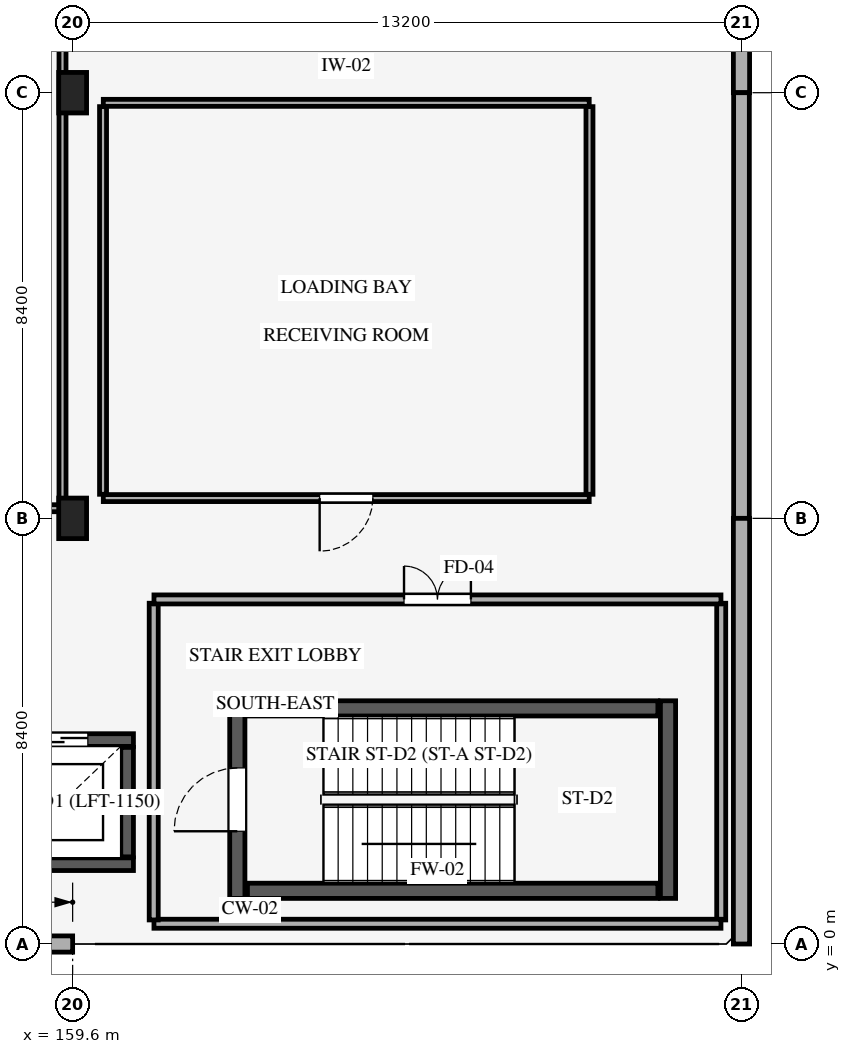
"""IFC4 building model, lengths in metres.
Left out: names, types, materials, properties, quantities, classifications, styles, units other than length and angle.
Written with IfcOpenShell. Run it as: python <this file> out.ifc"""

import sys

from ifc_helpers import new_model, si_unit, direction, frame, frame_2d, origin, origin_2d, place, context, subcontext, project, spatial, rectangle, extrude, element, fill, save


model = new_model("IFC4")
c1 = context("Model", 3, precision=1e-05, world=origin(), true_north=direction((0.0, 1.0)))
c2 = subcontext(c1, "Body", "Model", "MODEL_VIEW")
j1 = project(units=[si_unit("LENGTHUNIT", "METRE"), si_unit("PLANEANGLEUNIT", "RADIAN")], contexts=[c1])
p1 = place(None, origin())
s1 = spatial("IfcSite", under=j1, at=p1, CompositionType="ELEMENT")
p2 = place(p1, origin())
s2 = spatial("IfcBuilding", under=s1, at=p2, CompositionType="ELEMENT")
p3 = place(p2, origin())
s3 = spatial("IfcBuildingStorey", under=s2, at=p3, CompositionType="ELEMENT", Elevation=0.0)
p4 = place(p3, frame((159.6, 0.0, 0.0), z_axis=(0.0, 0.0, 1.0), x_axis=(1.0, 0.0, 0.0)))
e1 = element("IfcColumn", 1, at=p4, inside=s3, PredefinedType="COLUMN", context=c2, shape_type="SweptSolid", body=[
    extrude(rectangle(XDim=0.85, YDim=0.85, at=origin_2d()), origin(), (0.0, 0.0, 1.0), 4.8),
])
for number, where, z_axis, x_axis in (
    (2, (159.6, 8.4, 0.0), (0.0, 0.0, 1.0), (1.0, 0.0, 0.0)),
    (3, (159.6, 16.8, 0.0), (0.0, 0.0, 1.0), (1.0, 0.0, 0.0)),
):
    element("IfcColumn", number, at=place(p3, frame(where, z_axis=z_axis, x_axis=x_axis)), inside=s3, PredefinedType="COLUMN", context=c2, shape_type="SweptSolid", body=[
        extrude(rectangle(XDim=0.55, YDim=0.8, at=origin_2d()), origin(), (0.0, 0.0, 1.0), 4.8),
    ])
for number, where, z_axis, x_axis in (
    (4, (172.8, 0.0, 0.0), (0.0, 0.0, 1.0), (1.0, 0.0, 0.0)),
    (5, (172.8, 8.4, 0.0), (0.0, 0.0, 1.0), (1.0, 0.0, 0.0)),
    (6, (172.8, 16.8, 0.0), (0.0, 0.0, 1.0), (1.0, 0.0, 0.0)),
):
    element("IfcColumn", number, at=place(p3, frame(where, z_axis=z_axis, x_axis=x_axis)), inside=s3, PredefinedType="COLUMN", context=c2, shape_type="SweptSolid", body=[
        extrude(rectangle(XDim=0.85, YDim=0.85, at=origin_2d()), origin(), (0.0, 0.0, 1.0), 4.8),
    ])
p5 = place(p3, frame((172.8, 25.2, 0.0), z_axis=(0.0, 0.0, 1.0), x_axis=(0.0, -1.0, 0.0)))
e7 = element("IfcWall", 7, at=p5, inside=s3, PredefinedType="STANDARD", context=c2, shape_type="SweptSolid", body=[
    extrude(rectangle(XDim=8.4, YDim=0.32, at=frame_2d((4.2, 0.0))), origin(), (0.0, 0.0, 1.0), 3.67),
])
p6 = place(p3, frame((172.8, 16.8, 0.0), z_axis=(0.0, 0.0, 1.0), x_axis=(0.0, -1.0, 0.0)))
e8 = element("IfcWall", 8, at=p6, inside=s3, PredefinedType="STANDARD", context=c2, shape_type="SweptSolid", body=[
    extrude(rectangle(XDim=8.4, YDim=0.31, at=frame_2d((4.2, 0.0))), origin(), (0.0, 0.0, 1.0), 3.67),
])
p7 = place(p6, frame((2.3, 0.0, 0.0)))
e9 = element("IfcOpeningElement", 9, at=p7, cuts=e8, PredefinedType="OPENING", context=c2, shape_type="SweptSolid", body=[
    extrude(rectangle(XDim=3.8, YDim=3.25, at=frame_2d((1.9, 1.625))), frame((0.0, 0.165, 0.0), z_axis=(0.0, -1.0, 0.0), x_axis=(1.0, 0.0, 0.0)), (0.0, 0.0, 1.0), 0.33),
])
p8 = place(p3, frame((172.8, 8.4, 0.0), z_axis=(0.0, 0.0, 1.0), x_axis=(0.0, -1.0, 0.0)))
e10 = element("IfcWall", 10, at=p8, inside=s3, PredefinedType="STANDARD", context=c2, shape_type="SweptSolid", body=[
    extrude(rectangle(XDim=8.4, YDim=0.32, at=frame_2d((4.2, 0.0))), origin(), (0.0, 0.0, 1.0), 3.67),
])
p9 = place(p8, frame((2.138, 0.0, 1.2)))
e11 = element("IfcOpeningElement", 11, at=p9, cuts=e10, PredefinedType="OPENING", context=c2, shape_type="SweptSolid", body=[
    extrude(rectangle(XDim=1.8, YDim=1.35, at=frame_2d((0.9, 0.675))), frame((0.0, 0.17, 0.0), z_axis=(0.0, -1.0, 0.0), x_axis=(1.0, 0.0, 0.0)), (0.0, 0.0, 1.0), 0.34),
])
p10 = place(p8, frame((4.812, 0.0, 1.2)))
e12 = element("IfcOpeningElement", 12, at=p10, cuts=e10, PredefinedType="OPENING", context=c2, shape_type="SweptSolid", body=[
    extrude(rectangle(XDim=1.8, YDim=1.35, at=frame_2d((0.9, 0.675))), frame((0.0, 0.17, 0.0), z_axis=(0.0, -1.0, 0.0), x_axis=(1.0, 0.0, 0.0)), (0.0, 0.0, 1.0), 0.34),
])
p11 = place(p3, frame((159.6, 0.0, 0.0), z_axis=(0.0, 0.0, 1.0), x_axis=(-1.0, 0.0, 0.0)))
e13 = element("IfcWall", 13, at=p11, inside=s3, PredefinedType="STANDARD", context=c2, shape_type="SweptSolid", body=[
    extrude(rectangle(XDim=13.2, YDim=0.32, at=frame_2d((6.6, 0.0))), origin(), (0.0, 0.0, 1.0), 3.67),
])
p12 = place(p11, frame((3.324, 0.0, 1.2)))
e14 = element("IfcOpeningElement", 14, at=p12, cuts=e13, PredefinedType="OPENING", context=c2, shape_type="SweptSolid", body=[
    extrude(rectangle(XDim=1.8, YDim=1.35, at=frame_2d((0.9, 0.675))), frame((0.0, 0.17, 0.0), z_axis=(0.0, -1.0, 0.0), x_axis=(1.0, 0.0, 0.0)), (0.0, 0.0, 1.0), 0.34),
])
p13 = place(p11, frame((8.076, 0.0, 1.2)))
e15 = element("IfcOpeningElement", 15, at=p13, cuts=e13, PredefinedType="OPENING", context=c2, shape_type="SweptSolid", body=[
    extrude(rectangle(XDim=1.8, YDim=1.35, at=frame_2d((0.9, 0.675))), frame((0.0, 0.17, 0.0), z_axis=(0.0, -1.0, 0.0), x_axis=(1.0, 0.0, 0.0)), (0.0, 0.0, 1.0), 0.34),
])
p14 = place(p3, frame((162.85, 4.8, 0.0), z_axis=(0.0, 0.0, 1.0), x_axis=(0.0, -1.0, 0.0)))
e16 = element("IfcWall", 16, at=p14, inside=s3, PredefinedType="SHEAR", context=c2, shape_type="SweptSolid", body=[
    extrude(rectangle(XDim=3.9, YDim=0.3, at=frame_2d((1.95, 0.0))), origin(), (0.0, 0.0, 1.0), 4.495),
])
p15 = place(p14, frame((1.325, 0.0, 0.0)))
e17 = element("IfcOpeningElement", 17, at=p15, cuts=e16, PredefinedType="OPENING", context=c2, shape_type="SweptSolid", body=[
    extrude(rectangle(XDim=1.25, YDim=2.2, at=frame_2d((0.625, 1.1))), frame((0.0, 0.16, 0.0), z_axis=(0.0, -1.0, 0.0), x_axis=(1.0, 0.0, 0.0)), (0.0, 0.0, 1.0), 0.32),
])
p16 = place(p3, frame((163.05, 1.05, 0.0), z_axis=(0.0, 0.0, 1.0), x_axis=(1.0, 0.0, 0.0)))
e18 = element("IfcWall", 18, at=p16, inside=s3, PredefinedType="SHEAR", context=c2, shape_type="SweptSolid", body=[
    extrude(rectangle(XDim=8.1, YDim=0.3, at=frame_2d((4.05, 0.0))), origin(), (0.0, 0.0, 1.0), 4.495),
])
p17 = place(p3, frame((171.35, 0.9, 0.0), z_axis=(0.0, 0.0, 1.0), x_axis=(0.0, 1.0, 0.0)))
e19 = element("IfcWall", 19, at=p17, inside=s3, PredefinedType="SHEAR", context=c2, shape_type="SweptSolid", body=[
    extrude(rectangle(XDim=3.9, YDim=0.3, at=frame_2d((1.95, 0.0))), origin(), (0.0, 0.0, 1.0), 4.495),
])
p18 = place(p3, frame((171.15, 4.65, 0.0), z_axis=(0.0, 0.0, 1.0), x_axis=(-1.0, 0.0, 0.0)))
e20 = element("IfcWall", 20, at=p18, inside=s3, PredefinedType="SHEAR", context=c2, shape_type="SweptSolid", body=[
    extrude(rectangle(XDim=8.1, YDim=0.3, at=frame_2d((4.05, 0.0))), origin(), (0.0, 0.0, 1.0), 4.495),
])
p19 = place(p3, frame((160.8, 1.575, 0.0), z_axis=(0.0, 0.0, 1.0), x_axis=(-1.0, 0.0, 0.0)))
e21 = element("IfcWall", 21, at=p19, inside=s3, PredefinedType="SHEAR", context=c2, shape_type="SweptSolid", body=[
    extrude(rectangle(XDim=2.8, YDim=0.25, at=frame_2d((1.4, 0.0))), origin(), (0.0, 0.0, 1.0), 4.52),
])
p20 = place(p3, frame((158.0, 4.025, 0.0), z_axis=(0.0, 0.0, 1.0), x_axis=(1.0, 0.0, 0.0)))
e22 = element("IfcWall", 22, at=p20, inside=s3, PredefinedType="SHEAR", context=c2, shape_type="SweptSolid", body=[
    extrude(rectangle(XDim=2.8, YDim=0.25, at=frame_2d((1.4, 0.0))), origin(), (0.0, 0.0, 1.0), 4.52),
])
p21 = place(p20, frame((0.9, 0.0, 0.0)))
e23 = element("IfcOpeningElement", 23, at=p21, cuts=e22, PredefinedType="OPENING", context=c2, shape_type="SweptSolid", body=[
    extrude(rectangle(XDim=1.0, YDim=2.15, at=frame_2d((0.5, 1.075))), frame((0.0, 0.135, 0.0), z_axis=(0.0, -1.0, 0.0), x_axis=(1.0, 0.0, 0.0)), (0.0, 0.0, 1.0), 0.27),
])
p22 = place(p3, frame((160.675, 3.88, 0.0), z_axis=(0.0, 0.0, 1.0), x_axis=(0.0, -1.0, 0.0)))
e24 = element("IfcWall", 24, at=p22, inside=s3, PredefinedType="SHEAR", context=c2, shape_type="SweptSolid", body=[
    extrude(rectangle(XDim=2.16, YDim=0.25, at=frame_2d((1.08, 0.0))), origin(), (0.0, 0.0, 1.0), 4.52),
])
p23 = place(p3, frame((172.4, 6.725, 0.0), z_axis=(0.0, 0.0, 1.0), x_axis=(0.0, -1.0, 0.0)))
e25 = element("IfcWall", 25, at=p23, inside=s3, PredefinedType="STANDARD", context=c2, shape_type="SweptSolid", body=[
    extrude(rectangle(XDim=6.25, YDim=0.178, at=frame_2d((3.125, 0.0))), origin(), (0.0, 0.0, 1.0), 3.67),
])
p24 = place(p3, frame((172.395, 0.4, 0.0), z_axis=(0.0, 0.0, 1.0), x_axis=(-1.0, 0.0, 0.0)))
e26 = element("IfcWall", 26, at=p24, inside=s3, PredefinedType="STANDARD", context=c2, shape_type="SweptSolid", body=[
    extrude(rectangle(XDim=11.19, YDim=0.178, at=frame_2d((5.595, 0.0))), origin(), (0.0, 0.0, 1.0), 3.67),
])
p25 = place(p3, frame((161.2, 0.475, 0.0), z_axis=(0.0, 0.0, 1.0), x_axis=(0.0, 1.0, 0.0)))
e27 = element("IfcWall", 27, at=p25, inside=s3, PredefinedType="STANDARD", context=c2, shape_type="SweptSolid", body=[
    extrude(rectangle(XDim=6.25, YDim=0.178, at=frame_2d((3.125, 0.0))), origin(), (0.0, 0.0, 1.0), 4.49),
])
p26 = place(p3, frame((161.205, 6.8, 0.0), z_axis=(0.0, 0.0, 1.0), x_axis=(1.0, 0.0, 0.0)))
e28 = element("IfcWall", 28, at=p26, inside=s3, PredefinedType="STANDARD", context=c2, shape_type="SweptSolid", body=[
    extrude(rectangle(XDim=11.19, YDim=0.178, at=frame_2d((5.595, 0.0))), origin(), (0.0, 0.0, 1.0), 3.67),
])
p27 = place(p26, frame((4.935, 0.0, 0.0)))
e29 = element("IfcOpeningElement", 29, at=p27, cuts=e28, PredefinedType="OPENING", context=c2, shape_type="SweptSolid", body=[
    extrude(rectangle(XDim=1.32, YDim=2.22, at=frame_2d((0.66, 1.11))), frame((0.0, 0.099, 0.0), z_axis=(0.0, -1.0, 0.0), x_axis=(1.0, 0.0, 0.0)), (0.0, 0.0, 1.0), 0.198),
])
p28 = place(p3, frame((159.395, 8.6, 0.0), z_axis=(0.0, 0.0, 1.0), x_axis=(-1.0, 0.0, 0.0)))
e30 = element("IfcWall", 30, at=p28, inside=s3, PredefinedType="STANDARD", context=c2, shape_type="SweptSolid", body=[
    extrude(rectangle(XDim=35.59, YDim=0.138, at=frame_2d((17.795, 0.0))), origin(), (0.0, 0.0, 1.0), 3.27),
])
p29 = place(p28, frame((17.27, 0.0, 0.0)))
e31 = element("IfcOpeningElement", 31, at=p29, cuts=e30, PredefinedType="OPENING", context=c2, shape_type="SweptSolid", body=[
    extrude(rectangle(XDim=1.05, YDim=2.15, at=frame_2d((0.525, 1.075))), frame((0.0, 0.079, 0.0), z_axis=(0.0, -1.0, 0.0), x_axis=(1.0, 0.0, 0.0)), (0.0, 0.0, 1.0), 0.158),
])
p30 = place(p3, frame((159.4, 20.725, 0.0), z_axis=(0.0, 0.0, 1.0), x_axis=(0.0, -1.0, 0.0)))
e32 = element("IfcWall", 32, at=p30, inside=s3, PredefinedType="STANDARD", context=c2, shape_type="SweptSolid", body=[
    extrude(rectangle(XDim=12.05, YDim=0.138, at=frame_2d((6.025, 0.0))), origin(), (0.0, 0.0, 1.0), 3.27),
])
p31 = place(p3, frame((169.8, 16.525, 0.0), z_axis=(0.0, 0.0, 1.0), x_axis=(0.0, -1.0, 0.0)))
e33 = element("IfcWall", 33, at=p31, inside=s3, PredefinedType="STANDARD", context=c2, shape_type="SweptSolid", body=[
    extrude(rectangle(XDim=7.65, YDim=0.138, at=frame_2d((3.825, 0.0))), origin(), (0.0, 0.0, 1.0), 4.49),
])
p32 = place(p3, frame((169.795, 8.8, 0.0), z_axis=(0.0, 0.0, 1.0), x_axis=(-1.0, 0.0, 0.0)))
e34 = element("IfcWall", 34, at=p32, inside=s3, PredefinedType="STANDARD", context=c2, shape_type="SweptSolid", body=[
    extrude(rectangle(XDim=9.59, YDim=0.138, at=frame_2d((4.795, 0.0))), origin(), (0.0, 0.0, 1.0), 4.49),
])
p33 = place(p32, frame((4.27, 0.0, 0.0)))
e35 = element("IfcOpeningElement", 35, at=p33, cuts=e34, PredefinedType="OPENING", context=c2, shape_type="SweptSolid", body=[
    extrude(rectangle(XDim=1.05, YDim=2.15, at=frame_2d((0.525, 1.075))), frame((0.0, 0.079, 0.0), z_axis=(0.0, -1.0, 0.0), x_axis=(1.0, 0.0, 0.0)), (0.0, 0.0, 1.0), 0.158),
])
p34 = place(p3, frame((160.2, 8.875, 0.0), z_axis=(0.0, 0.0, 1.0), x_axis=(0.0, 1.0, 0.0)))
e36 = element("IfcWall", 36, at=p34, inside=s3, PredefinedType="STANDARD", context=c2, shape_type="SweptSolid", body=[
    extrude(rectangle(XDim=7.65, YDim=0.138, at=frame_2d((3.825, 0.0))), origin(), (0.0, 0.0, 1.0), 4.49),
])
p35 = place(p3, frame((160.205, 16.6, 0.0), z_axis=(0.0, 0.0, 1.0), x_axis=(1.0, 0.0, 0.0)))
e37 = element("IfcWall", 37, at=p35, inside=s3, PredefinedType="STANDARD", context=c2, shape_type="SweptSolid", body=[
    extrude(rectangle(XDim=9.59, YDim=0.138, at=frame_2d((4.795, 0.0))), origin(), (0.0, 0.0, 1.0), 4.49),
])
p36 = place(p7, origin())
e38 = element("IfcDoor", 38, at=p36, inside=s3, OperationType="ROLLINGUP", PredefinedType="GATE", context=c2, shape_type="SweptSolid", body=[
    extrude(rectangle(XDim=3.8, YDim=3.25, at=frame_2d((1.9, 1.625))), frame((0.0, 0.025, 0.0), z_axis=(0.0, -1.0, 0.0), x_axis=(1.0, 0.0, 0.0)), (0.0, 0.0, 1.0), 0.05),
])
fill(e9, e38)
p37 = place(p9, origin())
e39 = element("IfcWindow", 39, at=p37, inside=s3, PartitioningType="SINGLE_PANEL", PredefinedType="WINDOW", context=c2, shape_type="SweptSolid", body=[
    extrude(rectangle(XDim=1.8, YDim=1.35, at=frame_2d((0.9, 0.675))), frame((0.0, 0.03, 0.0), z_axis=(0.0, -1.0, 0.0), x_axis=(1.0, 0.0, 0.0)), (0.0, 0.0, 1.0), 0.06),
])
fill(e11, e39)
p38 = place(p10, origin())
e40 = element("IfcWindow", 40, at=p38, inside=s3, PartitioningType="SINGLE_PANEL", PredefinedType="WINDOW", context=c2, shape_type="SweptSolid", body=[
    extrude(rectangle(XDim=1.8, YDim=1.35, at=frame_2d((0.9, 0.675))), frame((0.0, 0.03, 0.0), z_axis=(0.0, -1.0, 0.0), x_axis=(1.0, 0.0, 0.0)), (0.0, 0.0, 1.0), 0.06),
])
fill(e12, e40)
p39 = place(p15, frame((1.25, 0.0, 0.0), z_axis=(0.0, 0.0, 1.0), x_axis=(-1.0, 0.0, 0.0)))
e41 = element("IfcDoor", 41, at=p39, inside=s3, OperationType="SINGLE_SWING_RIGHT", PredefinedType="DOOR", context=c2, shape_type="SweptSolid", body=[
    extrude(rectangle(XDim=1.25, YDim=2.2, at=frame_2d((0.625, 1.1))), frame((0.0, 0.025, 0.0), z_axis=(0.0, -1.0, 0.0), x_axis=(1.0, 0.0, 0.0)), (0.0, 0.0, 1.0), 0.05),
])
fill(e17, e41)
p40 = place(p21, origin())
e42 = element("IfcDoor", 42, at=p40, inside=s3, OperationType="DOUBLE_DOOR_SLIDING", PredefinedType="DOOR", context=c2, shape_type="SweptSolid", body=[
    extrude(rectangle(XDim=1.0, YDim=2.15, at=frame_2d((0.5, 1.075))), frame((0.0, 0.025, 0.0), z_axis=(0.0, -1.0, 0.0), x_axis=(1.0, 0.0, 0.0)), (0.0, 0.0, 1.0), 0.05),
])
fill(e23, e42)
p41 = place(p27, origin())
e43 = element("IfcDoor", 43, at=p41, inside=s3, OperationType="DOUBLE_DOOR_SINGLE_SWING", PredefinedType="DOOR", context=c2, shape_type="SweptSolid", body=[
    extrude(rectangle(XDim=1.32, YDim=2.22, at=frame_2d((0.66, 1.11))), frame((0.0, 0.025, 0.0), z_axis=(0.0, -1.0, 0.0), x_axis=(1.0, 0.0, 0.0)), (0.0, 0.0, 1.0), 0.05),
])
fill(e29, e43)
p42 = place(p33, origin())
e44 = element("IfcDoor", 44, at=p42, inside=s3, OperationType="SINGLE_SWING_RIGHT", PredefinedType="DOOR", context=c2, shape_type="SweptSolid", body=[
    extrude(rectangle(XDim=1.05, YDim=2.15, at=frame_2d((0.525, 1.075))), frame((0.0, 0.025, 0.0), z_axis=(0.0, -1.0, 0.0), x_axis=(1.0, 0.0, 0.0)), (0.0, 0.0, 1.0), 0.05),
])
fill(e35, e44)
save(model, sys.argv[1])
